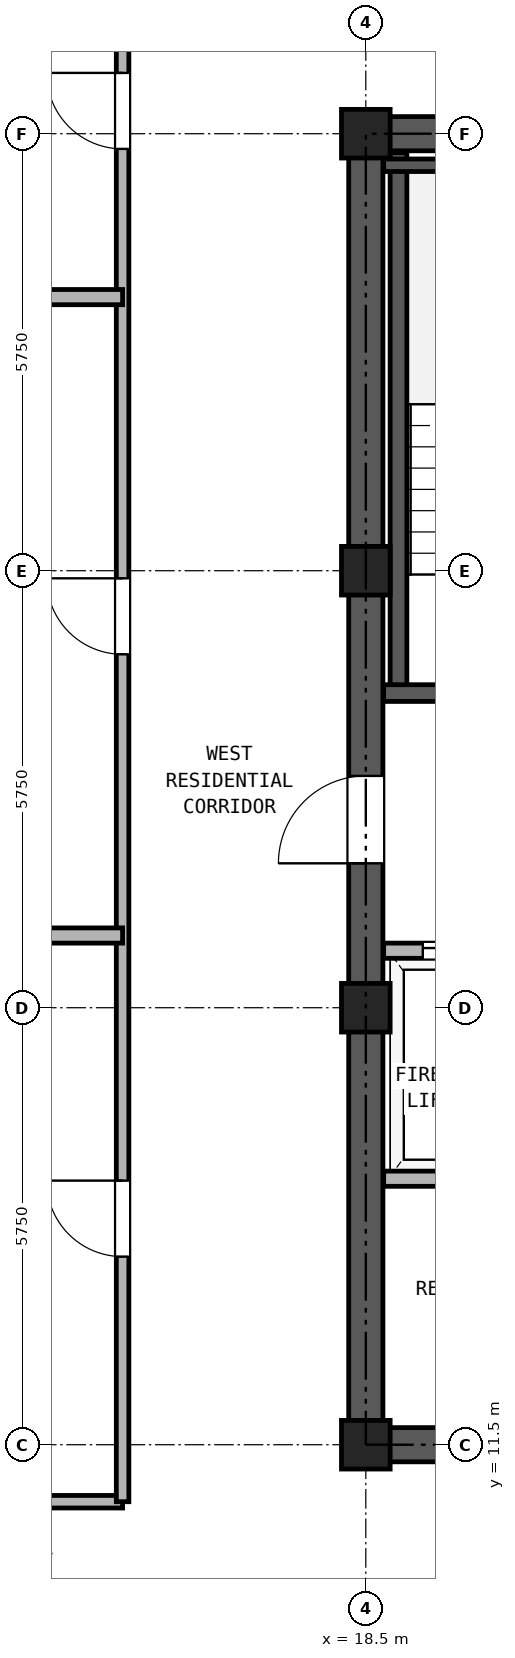
"""IFC4 building model, lengths in metres.
Left out: names, types, materials, properties, quantities, classifications, styles, units other than length and angle.
Written with IfcOpenShell. Run it as: python <this file> out.ifc"""

import sys

from ifc_helpers import new_model, si_unit, direction, frame, frame_2d, origin, origin_2d, place, context, subcontext, project, spatial, rectangle, hollow_rectangle, extrude, source, transform, mapped, element, fill, save


model = new_model("IFC4")
c1 = context("Model", 3, precision=1e-05, world=origin(), true_north=direction((0.0, 1.0)))
c2 = subcontext(c1, "Body", "Model", "MODEL_VIEW")
j1 = project(units=[si_unit("LENGTHUNIT", "METRE"), si_unit("PLANEANGLEUNIT", "RADIAN")], contexts=[c1])
p1 = place(None, origin())
s1 = spatial("IfcSite", under=j1, at=p1, CompositionType="ELEMENT")
p2 = place(p1, origin())
s2 = spatial("IfcBuilding", under=s1, at=p2, CompositionType="ELEMENT")
p3 = place(p2, frame((0.0, 0.0, 212.4)))
s3 = spatial("IfcBuildingStorey", under=s2, at=p3, CompositionType="ELEMENT", Elevation=212.4)
m1 = source(origin(), c2, "Body", "SweptSolid", [
    extrude(hollow_rectangle(XDim=0.64, YDim=0.64, WallThickness=0.035, at=origin_2d()), origin(), (0.0, 0.0, 1.0), 2.84),
])
for number, where, z_axis, x_axis in (
    (1, (18.5, 11.5, 0.0), (0.0, 0.0, 1.0), (1.0, 0.0, 0.0)),
    (2, (18.5, 17.25, 0.0), (0.0, 0.0, 1.0), (1.0, 0.0, 0.0)),
    (3, (18.5, 23.0, 0.0), (0.0, 0.0, 1.0), (1.0, 0.0, 0.0)),
    (4, (18.5, 28.75, 0.0), (0.0, 0.0, 1.0), (1.0, 0.0, 0.0)),
):
    element("IfcColumn", number, at=place(p3, frame(where, z_axis=z_axis, x_axis=x_axis)), inside=s3, PredefinedType="COLUMN", context=c2, shape_type="MappedRepresentation", body=[
        mapped(m1, transform((0.0, 0.0, 0.0), x_axis=(1.0, 0.0, 0.0), y_axis=(0.0, 1.0, 0.0), z_axis=(0.0, 0.0, 1.0), scale=1.0)),
    ])
p4 = place(p3, frame((18.275, 11.5, 0.0), z_axis=(0.0, 0.0, 1.0), x_axis=(1.0, 0.0, 0.0)))
e5 = element("IfcWall", 5, at=p4, inside=s3, PredefinedType="SHEAR", context=c2, shape_type="SweptSolid", body=[
    extrude(rectangle(XDim=10.45, YDim=0.45, at=frame_2d((5.225, 0.0))), origin(), (0.0, 0.0, 1.0), 2.84),
])
p5 = place(p4, frame((1.825, 0.0, 0.0)))
e6 = element("IfcOpeningElement", 6, at=p5, cuts=e5, PredefinedType="OPENING", context=c2, shape_type="SweptSolid", body=[
    extrude(rectangle(XDim=0.95, YDim=2.15, at=frame_2d((0.475, 1.075))), frame((0.0, 0.235, 0.0), z_axis=(0.0, -1.0, 0.0), x_axis=(1.0, 0.0, 0.0)), (0.0, 0.0, 1.0), 0.47),
])
p6 = place(p4, frame((5.325, 0.0, 0.0)))
e7 = element("IfcOpeningElement", 7, at=p6, cuts=e5, PredefinedType="OPENING", context=c2, shape_type="SweptSolid", body=[
    extrude(rectangle(XDim=0.95, YDim=2.15, at=frame_2d((0.475, 1.075))), frame((0.0, 0.235, 0.0), z_axis=(0.0, -1.0, 0.0), x_axis=(1.0, 0.0, 0.0)), (0.0, 0.0, 1.0), 0.47),
])
p7 = place(p4, frame((8.225, 0.0, 0.0)))
e8 = element("IfcOpeningElement", 8, at=p7, cuts=e5, PredefinedType="OPENING", context=c2, shape_type="SweptSolid", body=[
    extrude(rectangle(XDim=1.1, YDim=2.25, at=frame_2d((0.55, 1.125))), frame((0.0, 0.235, 0.0), z_axis=(0.0, -1.0, 0.0), x_axis=(1.0, 0.0, 0.0)), (0.0, 0.0, 1.0), 0.47),
])
p8 = place(p3, frame((18.275, 28.75, 0.0), z_axis=(0.0, 0.0, 1.0), x_axis=(1.0, 0.0, 0.0)))
e9 = element("IfcWall", 9, at=p8, inside=s3, PredefinedType="SHEAR", context=c2, shape_type="SweptSolid", body=[
    extrude(rectangle(XDim=10.45, YDim=0.45, at=frame_2d((5.225, 0.0))), origin(), (0.0, 0.0, 1.0), 2.84),
])
p9 = place(p8, frame((4.105, 0.0, 0.0)))
e10 = element("IfcOpeningElement", 10, at=p9, cuts=e9, PredefinedType="OPENING", context=c2, shape_type="SweptSolid", body=[
    extrude(rectangle(XDim=0.9, YDim=2.05, at=frame_2d((0.45, 1.025))), frame((0.0, 0.235, 0.0), z_axis=(0.0, -1.0, 0.0), x_axis=(1.0, 0.0, 0.0)), (0.0, 0.0, 1.0), 0.47),
])
p10 = place(p8, frame((5.645, 0.0, 0.0)))
e11 = element("IfcOpeningElement", 11, at=p10, cuts=e9, PredefinedType="OPENING", context=c2, shape_type="SweptSolid", body=[
    extrude(rectangle(XDim=0.9, YDim=2.05, at=frame_2d((0.45, 1.025))), frame((0.0, 0.235, 0.0), z_axis=(0.0, -1.0, 0.0), x_axis=(1.0, 0.0, 0.0)), (0.0, 0.0, 1.0), 0.47),
])
p11 = place(p3, frame((18.5, 11.725, 0.0), z_axis=(0.0, 0.0, 1.0), x_axis=(0.0, 1.0, 0.0)))
e12 = element("IfcWall", 12, at=p11, inside=s3, PredefinedType="SHEAR", context=c2, shape_type="SweptSolid", body=[
    extrude(rectangle(XDim=16.8, YDim=0.45, at=frame_2d((8.4, 0.0))), origin(), (0.0, 0.0, 1.0), 2.84),
])
p12 = place(p11, frame((7.425, 0.0, 0.0)))
e13 = element("IfcOpeningElement", 13, at=p12, cuts=e12, PredefinedType="OPENING", context=c2, shape_type="SweptSolid", body=[
    extrude(rectangle(XDim=1.15, YDim=2.2, at=frame_2d((0.575, 1.1))), frame((0.0, 0.235, 0.0), z_axis=(0.0, -1.0, 0.0), x_axis=(1.0, 0.0, 0.0)), (0.0, 0.0, 1.0), 0.47),
])
p13 = place(p3, frame((18.93, 21.39, 0.0), z_axis=(0.0, 0.0, 1.0), x_axis=(0.0, 1.0, 0.0)))
e14 = element("IfcWall", 14, at=p13, inside=s3, PredefinedType="SOLIDWALL", context=c2, shape_type="SweptSolid", body=[
    extrude(rectangle(XDim=7.11, YDim=0.22, at=frame_2d((3.555, 0.0))), origin(), (0.0, 0.0, 1.0), 2.84),
])
p14 = place(p3, frame((18.735, 28.335, 0.0), z_axis=(0.0, 0.0, 1.0), x_axis=(1.0, 0.0, 0.0)))
e15 = element("IfcWall", 15, at=p14, inside=s3, PredefinedType="PARTITIONING", context=c2, shape_type="SweptSolid", body=[
    extrude(rectangle(XDim=3.375, YDim=0.165, at=frame_2d((1.688, 0.0))), origin(), (0.0, 0.0, 1.0), 2.84),
])
p15 = place(p3, frame((18.735, 21.39, 0.0), z_axis=(0.0, 0.0, 1.0), x_axis=(1.0, 0.0, 0.0)))
e16 = element("IfcWall", 16, at=p15, inside=s3, PredefinedType="SOLIDWALL", context=c2, shape_type="SweptSolid", body=[
    extrude(rectangle(XDim=6.395, YDim=0.22, at=frame_2d((3.197, 0.0))), origin(), (0.0, 0.0, 1.0), 2.84),
])
p16 = place(p15, frame((1.115, 0.0, 0.0)))
e17 = element("IfcOpeningElement", 17, at=p16, cuts=e16, PredefinedType="OPENING", context=c2, shape_type="SweptSolid", body=[
    extrude(rectangle(XDim=1.15, YDim=2.2, at=frame_2d((0.575, 1.1))), frame((0.0, 0.12, 0.0), z_axis=(0.0, -1.0, 0.0), x_axis=(1.0, 0.0, 0.0)), (0.0, 0.0, 1.0), 0.24),
])
p17 = place(p15, frame((4.845, 0.0, 0.0)))
e18 = element("IfcOpeningElement", 18, at=p17, cuts=e16, PredefinedType="OPENING", context=c2, shape_type="SweptSolid", body=[
    extrude(rectangle(XDim=1.1, YDim=2.25, at=frame_2d((0.55, 1.125))), frame((0.0, 0.12, 0.0), z_axis=(0.0, -1.0, 0.0), x_axis=(1.0, 0.0, 0.0)), (0.0, 0.0, 1.0), 0.24),
])
p18 = place(p3, frame((18.735, 18.0, 0.0), z_axis=(0.0, 0.0, 1.0), x_axis=(1.0, 0.0, 0.0)))
e19 = element("IfcWall", 19, at=p18, inside=s3, PredefinedType="PARTITIONING", context=c2, shape_type="SweptSolid", body=[
    extrude(rectangle(XDim=9.53, YDim=0.2, at=frame_2d((4.765, 0.0))), origin(), (0.0, 0.0, 1.0), 2.84),
])
p19 = place(p18, frame((0.515, 0.0, 0.0)))
e20 = element("IfcOpeningElement", 20, at=p19, cuts=e19, PredefinedType="OPENING", context=c2, shape_type="SweptSolid", body=[
    extrude(rectangle(XDim=1.3, YDim=2.3, at=frame_2d((0.65, 1.15))), frame((0.0, 0.11, 0.0), z_axis=(0.0, -1.0, 0.0), x_axis=(1.0, 0.0, 0.0)), (0.0, 0.0, 1.0), 0.22),
])
p20 = place(p18, frame((2.615, 0.0, 0.0)))
e21 = element("IfcOpeningElement", 21, at=p20, cuts=e19, PredefinedType="OPENING", context=c2, shape_type="SweptSolid", body=[
    extrude(rectangle(XDim=1.3, YDim=2.3, at=frame_2d((0.65, 1.15))), frame((0.0, 0.11, 0.0), z_axis=(0.0, -1.0, 0.0), x_axis=(1.0, 0.0, 0.0)), (0.0, 0.0, 1.0), 0.22),
])
p21 = place(p18, frame((7.115, 0.0, 0.0)))
e22 = element("IfcOpeningElement", 22, at=p21, cuts=e19, PredefinedType="OPENING", context=c2, shape_type="SweptSolid", body=[
    extrude(rectangle(XDim=1.0, YDim=2.15, at=frame_2d((0.5, 1.075))), frame((0.0, 0.11, 0.0), z_axis=(0.0, -1.0, 0.0), x_axis=(1.0, 0.0, 0.0)), (0.0, 0.0, 1.0), 0.22),
])
p22 = place(p3, frame((18.735, 15.0, 0.0), z_axis=(0.0, 0.0, 1.0), x_axis=(1.0, 0.0, 0.0)))
e23 = element("IfcWall", 23, at=p22, inside=s3, PredefinedType="PARTITIONING", context=c2, shape_type="SweptSolid", body=[
    extrude(rectangle(XDim=9.53, YDim=0.2, at=frame_2d((4.765, 0.0))), origin(), (0.0, 0.0, 1.0), 2.84),
])
p23 = place(p3, frame((7.6, 10.75, 0.0), z_axis=(0.0, 0.0, 1.0), x_axis=(1.0, 0.0, 0.0)))
e24 = element("IfcWall", 24, at=p23, inside=s3, PredefinedType="PARTITIONING", context=c2, shape_type="SweptSolid", body=[
    extrude(rectangle(XDim=7.7, YDim=0.165, at=frame_2d((3.85, 0.0))), origin(), (0.0, 0.0, 1.0), 2.84),
])
p24 = place(p3, frame((15.3, 10.75, 0.0), z_axis=(0.0, 0.0, 1.0), x_axis=(0.0, 1.0, 0.0)))
e25 = element("IfcWall", 25, at=p24, inside=s3, PredefinedType="PARTITIONING", context=c2, shape_type="SweptSolid", body=[
    extrude(rectangle(XDim=24.39, YDim=0.165, at=frame_2d((12.195, 0.0))), origin(), (0.0, 0.0, 1.0), 2.84),
])
p25 = place(p24, frame((3.225, 0.0, 0.0)))
e26 = element("IfcOpeningElement", 26, at=p25, cuts=e25, PredefinedType="OPENING", context=c2, shape_type="SweptSolid", body=[
    extrude(rectangle(XDim=1.0, YDim=2.15, at=frame_2d((0.5, 1.075))), frame((0.0, 0.093, 0.0), z_axis=(0.0, -1.0, 0.0), x_axis=(1.0, 0.0, 0.0)), (0.0, 0.0, 1.0), 0.185),
])
p26 = place(p24, frame((11.15, 0.0, 0.0)))
e27 = element("IfcOpeningElement", 27, at=p26, cuts=e25, PredefinedType="OPENING", context=c2, shape_type="SweptSolid", body=[
    extrude(rectangle(XDim=1.0, YDim=2.15, at=frame_2d((0.5, 1.075))), frame((0.0, 0.093, 0.0), z_axis=(0.0, -1.0, 0.0), x_axis=(1.0, 0.0, 0.0)), (0.0, 0.0, 1.0), 0.185),
])
p27 = place(p24, frame((17.8, 0.0, 0.0)))
e28 = element("IfcOpeningElement", 28, at=p27, cuts=e25, PredefinedType="OPENING", context=c2, shape_type="SweptSolid", body=[
    extrude(rectangle(XDim=1.0, YDim=2.15, at=frame_2d((0.5, 1.075))), frame((0.0, 0.093, 0.0), z_axis=(0.0, -1.0, 0.0), x_axis=(1.0, 0.0, 0.0)), (0.0, 0.0, 1.0), 0.185),
])
for number, where, z_axis, x_axis in (
    (29, (0.16, 18.2, 0.0), (0.0, 0.0, 1.0), (1.0, 0.0, 0.0)),
    (30, (0.16, 26.6, 0.0), (0.0, 0.0, 1.0), (1.0, 0.0, 0.0)),
):
    element("IfcWall", number, at=place(p3, frame(where, z_axis=z_axis, x_axis=x_axis)), inside=s3, PredefinedType="PARTITIONING", context=c2, shape_type="SweptSolid", body=[
        extrude(rectangle(XDim=15.14, YDim=0.2, at=frame_2d((7.57, 0.0))), origin(), (0.0, 0.0, 1.0), 2.84),
    ])
p28 = place(p19, origin())
e31 = element("IfcDoor", 31, at=p28, inside=s3, OperationType="DOUBLE_DOOR_SLIDING", PredefinedType="DOOR", context=c2, shape_type="SweptSolid", body=[
    extrude(rectangle(XDim=1.3, YDim=2.3, at=frame_2d((0.65, 1.15))), frame((0.0, 0.025, 0.0), z_axis=(0.0, -1.0, 0.0), x_axis=(1.0, 0.0, 0.0)), (0.0, 0.0, 1.0), 0.05),
])
fill(e20, e31)
p29 = place(p12, frame((1.15, 0.0, 0.0), z_axis=(0.0, 0.0, 1.0), x_axis=(-1.0, 0.0, 0.0)))
e32 = element("IfcDoor", 32, at=p29, inside=s3, OperationType="SINGLE_SWING_LEFT", PredefinedType="DOOR", context=c2, shape_type="SweptSolid", body=[
    extrude(rectangle(XDim=1.15, YDim=2.2, at=frame_2d((0.575, 1.1))), frame((0.0, 0.025, 0.0), z_axis=(0.0, -1.0, 0.0), x_axis=(1.0, 0.0, 0.0)), (0.0, 0.0, 1.0), 0.05),
])
fill(e13, e32)
p30 = place(p25, origin())
e33 = element("IfcDoor", 33, at=p30, inside=s3, OperationType="SINGLE_SWING_RIGHT", PredefinedType="DOOR", context=c2, shape_type="SweptSolid", body=[
    extrude(rectangle(XDim=1.0, YDim=2.15, at=frame_2d((0.5, 1.075))), frame((0.0, 0.025, 0.0), z_axis=(0.0, -1.0, 0.0), x_axis=(1.0, 0.0, 0.0)), (0.0, 0.0, 1.0), 0.05),
])
fill(e26, e33)
p31 = place(p26, origin())
e34 = element("IfcDoor", 34, at=p31, inside=s3, OperationType="SINGLE_SWING_RIGHT", PredefinedType="DOOR", context=c2, shape_type="SweptSolid", body=[
    extrude(rectangle(XDim=1.0, YDim=2.15, at=frame_2d((0.5, 1.075))), frame((0.0, 0.025, 0.0), z_axis=(0.0, -1.0, 0.0), x_axis=(1.0, 0.0, 0.0)), (0.0, 0.0, 1.0), 0.05),
])
fill(e27, e34)
p32 = place(p27, origin())
e35 = element("IfcDoor", 35, at=p32, inside=s3, OperationType="SINGLE_SWING_RIGHT", PredefinedType="DOOR", context=c2, shape_type="SweptSolid", body=[
    extrude(rectangle(XDim=1.0, YDim=2.15, at=frame_2d((0.5, 1.075))), frame((0.0, 0.025, 0.0), z_axis=(0.0, -1.0, 0.0), x_axis=(1.0, 0.0, 0.0)), (0.0, 0.0, 1.0), 0.05),
])
fill(e28, e35)
save(model, sys.argv[1])
